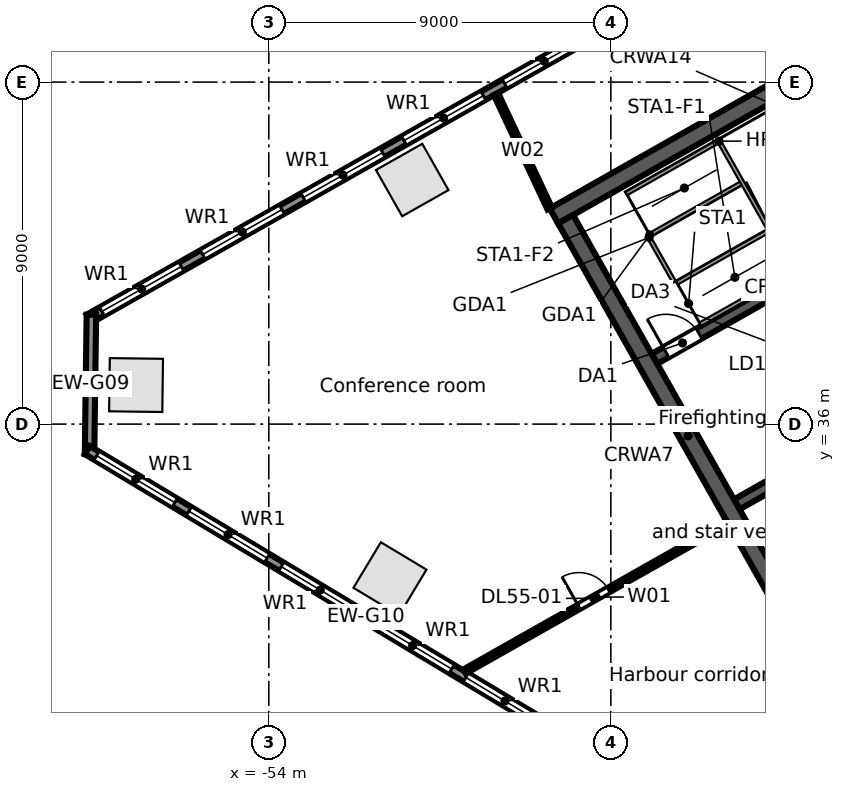
"""IFC4 building model, lengths in metres.
Left out: names, types, materials, properties, quantities, classifications, styles, units other than length and angle.
Written with IfcOpenShell. Run it as: python <this file> out.ifc"""

import sys

from ifc_helpers import new_model, si_unit, direction, frame, frame_2d, origin, origin_2d, place, context, subcontext, project, spatial, rectangle, extrude, element, fill, save


model = new_model("IFC4")
c1 = context("Model", 3, precision=1e-05, world=origin(), true_north=direction((0.0, 1.0)))
c2 = subcontext(c1, "Body", "Model", "MODEL_VIEW")
j1 = project(units=[si_unit("LENGTHUNIT", "METRE"), si_unit("PLANEANGLEUNIT", "RADIAN")], contexts=[c1])
p1 = place(None, origin())
s1 = spatial("IfcSite", under=j1, at=p1, CompositionType="ELEMENT")
p2 = place(p1, origin())
s2 = spatial("IfcBuilding", under=s1, at=p2, CompositionType="ELEMENT")
p3 = place(p2, frame((0.0, 0.0, 250.4)))
s3 = spatial("IfcBuildingStorey", under=s2, at=p3, CompositionType="ELEMENT", Elevation=250.4)
for number, where, z_axis, x_axis in (
    (1, (-50.226, 42.423, 0.0), (0.0, 0.0, 1.0), (-0.87, -0.492, 0.0)),
    (2, (-57.493, 37.027, 0.0), (0.0, 0.0, 1.0), (-0.013, -1.0, 0.0)),
    (3, (-50.812, 31.931, 0.0), (0.0, 0.0, 1.0), (0.857, -0.515, 0.0)),
):
    element("IfcColumn", number, at=place(p3, frame(where, z_axis=z_axis, x_axis=x_axis)), inside=s3, PredefinedType="COLUMN", context=c2, shape_type="SweptSolid", body=[
        extrude(rectangle(XDim=1.4, YDim=1.4, at=origin_2d()), origin(), (0.0, 0.0, 1.0), 3.9),
    ])
p4 = place(p3, frame((-58.732, 38.771, 0.0), z_axis=(0.0, 0.0, 1.0), x_axis=(0.870354824205, 0.492425100887, 0.0)))
e4 = element("IfcWall", 4, at=p4, inside=s3, PredefinedType="STANDARD", context=c2, shape_type="SweptSolid", body=[
    extrude(rectangle(XDim=64.006, YDim=0.25, at=frame_2d((32.003, 0.0))), origin(), (0.0, 0.0, 1.0), 3.62),
])
p5 = place(p4, frame((61.259, 0.0, 0.8)))
e5 = element("IfcOpeningElement", 5, at=p5, cuts=e4, PredefinedType="OPENING", context=c2, shape_type="SweptSolid", body=[
    extrude(rectangle(XDim=2.4, YDim=2.2, at=frame_2d((1.2, 1.1))), frame((0.0, 0.135, 0.0), z_axis=(0.0, -1.0, 0.0), x_axis=(1.0, 0.0, 0.0)), (0.0, 0.0, 1.0), 0.27),
])
p6 = place(p4, frame((58.216, 0.0, 0.8)))
e6 = element("IfcOpeningElement", 6, at=p6, cuts=e4, PredefinedType="OPENING", context=c2, shape_type="SweptSolid", body=[
    extrude(rectangle(XDim=2.4, YDim=2.2, at=frame_2d((1.2, 1.1))), frame((0.0, 0.135, 0.0), z_axis=(0.0, -1.0, 0.0), x_axis=(1.0, 0.0, 0.0)), (0.0, 0.0, 1.0), 0.27),
])
p7 = place(p4, frame((55.173, 0.0, 0.8)))
e7 = element("IfcOpeningElement", 7, at=p7, cuts=e4, PredefinedType="OPENING", context=c2, shape_type="SweptSolid", body=[
    extrude(rectangle(XDim=2.4, YDim=2.2, at=frame_2d((1.2, 1.1))), frame((0.0, 0.135, 0.0), z_axis=(0.0, -1.0, 0.0), x_axis=(1.0, 0.0, 0.0)), (0.0, 0.0, 1.0), 0.27),
])
p8 = place(p4, frame((52.129, 0.0, 0.8)))
e8 = element("IfcOpeningElement", 8, at=p8, cuts=e4, PredefinedType="OPENING", context=c2, shape_type="SweptSolid", body=[
    extrude(rectangle(XDim=2.4, YDim=2.2, at=frame_2d((1.2, 1.1))), frame((0.0, 0.135, 0.0), z_axis=(0.0, -1.0, 0.0), x_axis=(1.0, 0.0, 0.0)), (0.0, 0.0, 1.0), 0.27),
])
p9 = place(p4, frame((49.086, 0.0, 0.8)))
e9 = element("IfcOpeningElement", 9, at=p9, cuts=e4, PredefinedType="OPENING", context=c2, shape_type="SweptSolid", body=[
    extrude(rectangle(XDim=2.4, YDim=2.2, at=frame_2d((1.2, 1.1))), frame((0.0, 0.135, 0.0), z_axis=(0.0, -1.0, 0.0), x_axis=(1.0, 0.0, 0.0)), (0.0, 0.0, 1.0), 0.27),
])
p10 = place(p4, frame((46.043, 0.0, 0.8)))
e10 = element("IfcOpeningElement", 10, at=p10, cuts=e4, PredefinedType="OPENING", context=c2, shape_type="SweptSolid", body=[
    extrude(rectangle(XDim=2.4, YDim=2.2, at=frame_2d((1.2, 1.1))), frame((0.0, 0.135, 0.0), z_axis=(0.0, -1.0, 0.0), x_axis=(1.0, 0.0, 0.0)), (0.0, 0.0, 1.0), 0.27),
])
p11 = place(p4, frame((43.0, 0.0, 0.8)))
e11 = element("IfcOpeningElement", 11, at=p11, cuts=e4, PredefinedType="OPENING", context=c2, shape_type="SweptSolid", body=[
    extrude(rectangle(XDim=2.4, YDim=2.2, at=frame_2d((1.2, 1.1))), frame((0.0, 0.135, 0.0), z_axis=(0.0, -1.0, 0.0), x_axis=(1.0, 0.0, 0.0)), (0.0, 0.0, 1.0), 0.27),
])
p12 = place(p4, frame((39.956, 0.0, 0.8)))
e12 = element("IfcOpeningElement", 12, at=p12, cuts=e4, PredefinedType="OPENING", context=c2, shape_type="SweptSolid", body=[
    extrude(rectangle(XDim=2.4, YDim=2.2, at=frame_2d((1.2, 1.1))), frame((0.0, 0.135, 0.0), z_axis=(0.0, -1.0, 0.0), x_axis=(1.0, 0.0, 0.0)), (0.0, 0.0, 1.0), 0.27),
])
p13 = place(p4, frame((36.913, 0.0, 0.8)))
e13 = element("IfcOpeningElement", 13, at=p13, cuts=e4, PredefinedType="OPENING", context=c2, shape_type="SweptSolid", body=[
    extrude(rectangle(XDim=2.4, YDim=2.2, at=frame_2d((1.2, 1.1))), frame((0.0, 0.135, 0.0), z_axis=(0.0, -1.0, 0.0), x_axis=(1.0, 0.0, 0.0)), (0.0, 0.0, 1.0), 0.27),
])
p14 = place(p4, frame((33.87, 0.0, 0.8)))
e14 = element("IfcOpeningElement", 14, at=p14, cuts=e4, PredefinedType="OPENING", context=c2, shape_type="SweptSolid", body=[
    extrude(rectangle(XDim=2.4, YDim=2.2, at=frame_2d((1.2, 1.1))), frame((0.0, 0.135, 0.0), z_axis=(0.0, -1.0, 0.0), x_axis=(1.0, 0.0, 0.0)), (0.0, 0.0, 1.0), 0.27),
])
p15 = place(p4, frame((30.826, 0.0, 0.8)))
e15 = element("IfcOpeningElement", 15, at=p15, cuts=e4, PredefinedType="OPENING", context=c2, shape_type="SweptSolid", body=[
    extrude(rectangle(XDim=2.4, YDim=2.2, at=frame_2d((1.2, 1.1))), frame((0.0, 0.135, 0.0), z_axis=(0.0, -1.0, 0.0), x_axis=(1.0, 0.0, 0.0)), (0.0, 0.0, 1.0), 0.27),
])
p16 = place(p4, frame((27.783, 0.0, 0.8)))
e16 = element("IfcOpeningElement", 16, at=p16, cuts=e4, PredefinedType="OPENING", context=c2, shape_type="SweptSolid", body=[
    extrude(rectangle(XDim=2.4, YDim=2.2, at=frame_2d((1.2, 1.1))), frame((0.0, 0.135, 0.0), z_axis=(0.0, -1.0, 0.0), x_axis=(1.0, 0.0, 0.0)), (0.0, 0.0, 1.0), 0.27),
])
p17 = place(p4, frame((24.74, 0.0, 0.8)))
e17 = element("IfcOpeningElement", 17, at=p17, cuts=e4, PredefinedType="OPENING", context=c2, shape_type="SweptSolid", body=[
    extrude(rectangle(XDim=2.4, YDim=2.2, at=frame_2d((1.2, 1.1))), frame((0.0, 0.135, 0.0), z_axis=(0.0, -1.0, 0.0), x_axis=(1.0, 0.0, 0.0)), (0.0, 0.0, 1.0), 0.27),
])
p18 = place(p4, frame((21.696, 0.0, 0.8)))
e18 = element("IfcOpeningElement", 18, at=p18, cuts=e4, PredefinedType="OPENING", context=c2, shape_type="SweptSolid", body=[
    extrude(rectangle(XDim=2.4, YDim=2.2, at=frame_2d((1.2, 1.1))), frame((0.0, 0.135, 0.0), z_axis=(0.0, -1.0, 0.0), x_axis=(1.0, 0.0, 0.0)), (0.0, 0.0, 1.0), 0.27),
])
p19 = place(p4, frame((18.653, 0.0, 0.8)))
e19 = element("IfcOpeningElement", 19, at=p19, cuts=e4, PredefinedType="OPENING", context=c2, shape_type="SweptSolid", body=[
    extrude(rectangle(XDim=2.4, YDim=2.2, at=frame_2d((1.2, 1.1))), frame((0.0, 0.135, 0.0), z_axis=(0.0, -1.0, 0.0), x_axis=(1.0, 0.0, 0.0)), (0.0, 0.0, 1.0), 0.27),
])
p20 = place(p4, frame((15.61, 0.0, 0.8)))
e20 = element("IfcOpeningElement", 20, at=p20, cuts=e4, PredefinedType="OPENING", context=c2, shape_type="SweptSolid", body=[
    extrude(rectangle(XDim=2.4, YDim=2.2, at=frame_2d((1.2, 1.1))), frame((0.0, 0.135, 0.0), z_axis=(0.0, -1.0, 0.0), x_axis=(1.0, 0.0, 0.0)), (0.0, 0.0, 1.0), 0.27),
])
p21 = place(p4, frame((12.567, 0.0, 0.8)))
e21 = element("IfcOpeningElement", 21, at=p21, cuts=e4, PredefinedType="OPENING", context=c2, shape_type="SweptSolid", body=[
    extrude(rectangle(XDim=2.4, YDim=2.2, at=frame_2d((1.2, 1.1))), frame((0.0, 0.135, 0.0), z_axis=(0.0, -1.0, 0.0), x_axis=(1.0, 0.0, 0.0)), (0.0, 0.0, 1.0), 0.27),
])
p22 = place(p4, frame((9.523, 0.0, 0.8)))
e22 = element("IfcOpeningElement", 22, at=p22, cuts=e4, PredefinedType="OPENING", context=c2, shape_type="SweptSolid", body=[
    extrude(rectangle(XDim=2.4, YDim=2.2, at=frame_2d((1.2, 1.1))), frame((0.0, 0.135, 0.0), z_axis=(0.0, -1.0, 0.0), x_axis=(1.0, 0.0, 0.0)), (0.0, 0.0, 1.0), 0.27),
])
p23 = place(p4, frame((6.48, 0.0, 0.8)))
e23 = element("IfcOpeningElement", 23, at=p23, cuts=e4, PredefinedType="OPENING", context=c2, shape_type="SweptSolid", body=[
    extrude(rectangle(XDim=2.4, YDim=2.2, at=frame_2d((1.2, 1.1))), frame((0.0, 0.135, 0.0), z_axis=(0.0, -1.0, 0.0), x_axis=(1.0, 0.0, 0.0)), (0.0, 0.0, 1.0), 0.27),
])
p24 = place(p4, frame((3.437, 0.0, 0.8)))
e24 = element("IfcOpeningElement", 24, at=p24, cuts=e4, PredefinedType="OPENING", context=c2, shape_type="SweptSolid", body=[
    extrude(rectangle(XDim=2.4, YDim=2.2, at=frame_2d((1.2, 1.1))), frame((0.0, 0.135, 0.0), z_axis=(0.0, -1.0, 0.0), x_axis=(1.0, 0.0, 0.0)), (0.0, 0.0, 1.0), 0.27),
])
p25 = place(p4, frame((0.393, 0.0, 0.8)))
e25 = element("IfcOpeningElement", 25, at=p25, cuts=e4, PredefinedType="OPENING", context=c2, shape_type="SweptSolid", body=[
    extrude(rectangle(XDim=2.4, YDim=2.2, at=frame_2d((1.2, 1.1))), frame((0.0, 0.135, 0.0), z_axis=(0.0, -1.0, 0.0), x_axis=(1.0, 0.0, 0.0)), (0.0, 0.0, 1.0), 0.27),
])
p26 = place(p3, frame((-58.717, 35.208, 0.0), z_axis=(0.0, 0.0, 1.0), x_axis=(0.01310512158, 0.999914124207, 0.0)))
e26 = element("IfcWall", 26, at=p26, inside=s3, PredefinedType="STANDARD", context=c2, shape_type="SweptSolid", body=[
    extrude(rectangle(XDim=3.67, YDim=0.25, at=frame_2d((1.835, 0.0))), origin(), (0.0, 0.0, 1.0), 3.62),
])
p27 = place(p3, frame((-44.115, 26.507, 0.0), z_axis=(0.0, 0.0, 1.0), x_axis=(-0.857166583633, 0.515039268311, 0.0)))
e27 = element("IfcWall", 27, at=p27, inside=s3, PredefinedType="STANDARD", context=c2, shape_type="SweptSolid", body=[
    extrude(rectangle(XDim=17.106, YDim=0.25, at=frame_2d((8.553, 0.0))), origin(), (0.0, 0.0, 1.0), 3.62),
])
p28 = place(p27, frame((14.417, 0.0, 0.8)))
e28 = element("IfcOpeningElement", 28, at=p28, cuts=e27, PredefinedType="OPENING", context=c2, shape_type="SweptSolid", body=[
    extrude(rectangle(XDim=2.4, YDim=2.2, at=frame_2d((1.2, 1.1))), frame((0.0, 0.135, 0.0), z_axis=(0.0, -1.0, 0.0), x_axis=(1.0, 0.0, 0.0)), (0.0, 0.0, 1.0), 0.27),
])
p29 = place(p27, frame((11.584, 0.0, 0.8)))
e29 = element("IfcOpeningElement", 29, at=p29, cuts=e27, PredefinedType="OPENING", context=c2, shape_type="SweptSolid", body=[
    extrude(rectangle(XDim=2.4, YDim=2.2, at=frame_2d((1.2, 1.1))), frame((0.0, 0.135, 0.0), z_axis=(0.0, -1.0, 0.0), x_axis=(1.0, 0.0, 0.0)), (0.0, 0.0, 1.0), 0.27),
])
p30 = place(p27, frame((8.75, 0.0, 0.8)))
e30 = element("IfcOpeningElement", 30, at=p30, cuts=e27, PredefinedType="OPENING", context=c2, shape_type="SweptSolid", body=[
    extrude(rectangle(XDim=2.4, YDim=2.2, at=frame_2d((1.2, 1.1))), frame((0.0, 0.135, 0.0), z_axis=(0.0, -1.0, 0.0), x_axis=(1.0, 0.0, 0.0)), (0.0, 0.0, 1.0), 0.27),
])
p31 = place(p27, frame((5.917, 0.0, 0.8)))
e31 = element("IfcOpeningElement", 31, at=p31, cuts=e27, PredefinedType="OPENING", context=c2, shape_type="SweptSolid", body=[
    extrude(rectangle(XDim=2.4, YDim=2.2, at=frame_2d((1.2, 1.1))), frame((0.0, 0.135, 0.0), z_axis=(0.0, -1.0, 0.0), x_axis=(1.0, 0.0, 0.0)), (0.0, 0.0, 1.0), 0.27),
])
p32 = place(p27, frame((3.084, 0.0, 0.8)))
e32 = element("IfcOpeningElement", 32, at=p32, cuts=e27, PredefinedType="OPENING", context=c2, shape_type="SweptSolid", body=[
    extrude(rectangle(XDim=2.4, YDim=2.2, at=frame_2d((1.2, 1.1))), frame((0.0, 0.135, 0.0), z_axis=(0.0, -1.0, 0.0), x_axis=(1.0, 0.0, 0.0)), (0.0, 0.0, 1.0), 0.27),
])
p33 = place(p27, frame((0.25, 0.0, 0.8)))
e33 = element("IfcOpeningElement", 33, at=p33, cuts=e27, PredefinedType="OPENING", context=c2, shape_type="SweptSolid", body=[
    extrude(rectangle(XDim=2.4, YDim=2.2, at=frame_2d((1.2, 1.1))), frame((0.0, 0.135, 0.0), z_axis=(0.0, -1.0, 0.0), x_axis=(1.0, 0.0, 0.0)), (0.0, 0.0, 1.0), 0.27),
])
p34 = place(p3, frame((-41.687, 33.887, 0.0), z_axis=(0.0, 0.0, 1.0), x_axis=(0.870355736587, 0.49242348826, 0.0)))
e34 = element("IfcWall", 34, at=p34, inside=s3, PredefinedType="SOLIDWALL", context=c2, shape_type="SweptSolid", body=[
    extrude(rectangle(XDim=6.15, YDim=0.3, at=frame_2d((3.075, 0.0))), origin(), (0.0, 0.0, 1.0), 3.62),
])
p35 = place(p34, frame((1.25, 0.0, 0.0)))
e35 = element("IfcOpeningElement", 35, at=p35, cuts=e34, PredefinedType="OPENING", context=c2, shape_type="SweptSolid", body=[
    extrude(rectangle(XDim=1.1, YDim=2.1, at=frame_2d((0.55, 1.05))), frame((0.0, 0.16, 0.0), z_axis=(0.0, -1.0, 0.0), x_axis=(1.0, 0.0, 0.0)), (0.0, 0.0, 1.0), 0.32),
])
p36 = place(p34, frame((4.4, 0.0, 0.0)))
e36 = element("IfcOpeningElement", 36, at=p36, cuts=e34, PredefinedType="OPENING", context=c2, shape_type="SweptSolid", body=[
    extrude(rectangle(XDim=1.1, YDim=2.1, at=frame_2d((0.55, 1.05))), frame((0.0, 0.16, 0.0), z_axis=(0.0, -1.0, 0.0), x_axis=(1.0, 0.0, 0.0)), (0.0, 0.0, 1.0), 0.32),
])
p37 = place(p3, frame((-43.853, 37.717, 0.0), z_axis=(0.0, 0.0, 1.0), x_axis=(0.870360409231, 0.492415229297, 0.0)))
e37 = element("IfcWall", 37, at=p37, inside=s3, PredefinedType="SOLIDWALL", context=c2, shape_type="SweptSolid", body=[
    extrude(rectangle(XDim=7.55, YDim=0.3, at=frame_2d((3.775, 0.0))), origin(), (0.0, 0.0, 1.0), 3.62),
])
p38 = place(p37, frame((0.35, 0.0, 0.0)))
e38 = element("IfcOpeningElement", 38, at=p38, cuts=e37, PredefinedType="OPENING", context=c2, shape_type="SweptSolid", body=[
    extrude(rectangle(XDim=1.0, YDim=2.1, at=frame_2d((0.5, 1.05))), frame((0.0, 0.16, 0.0), z_axis=(0.0, -1.0, 0.0), x_axis=(1.0, 0.0, 0.0)), (0.0, 0.0, 1.0), 0.32),
])
p39 = place(p3, frame((-46.498, 41.477, 0.0), z_axis=(0.0, 0.0, 1.0), x_axis=(0.870359753402, 0.492416388494, 0.0)))
e39 = element("IfcWall", 39, at=p39, inside=s3, PredefinedType="SOLIDWALL", context=c2, shape_type="SweptSolid", body=[
    extrude(rectangle(XDim=17.0, YDim=0.45, at=frame_2d((8.5, 0.0))), origin(), (0.0, 0.0, 1.0), 3.62),
])
p40 = place(p3, frame((-46.191, 41.392, 0.0), z_axis=(0.0, 0.0, 1.0), x_axis=(0.492421378713, -0.870356930107, 0.0)))
e40 = element("IfcWall", 40, at=p40, inside=s3, PredefinedType="SOLIDWALL", context=c2, shape_type="SweptSolid", body=[
    extrude(rectangle(XDim=13.1, YDim=0.45, at=frame_2d((6.55, 0.0))), origin(), (0.0, 0.0, 1.0), 3.62),
])
p41 = place(p3, frame((-48.843, 29.494, 0.0), z_axis=(0.0, 0.0, 1.0), x_axis=(0.870384139606, 0.492373282705, 0.0)))
e41 = element("IfcWall", 41, at=p41, inside=s3, PredefinedType="PARTITIONING", context=c2, shape_type="SweptSolid", body=[
    extrude(rectangle(XDim=7.941, YDim=0.125, at=frame_2d((3.971, 0.0))), origin(), (0.0, 0.0, 1.0), 2.9),
])
p42 = place(p41, frame((3.45, 0.0, 0.0)))
e42 = element("IfcOpeningElement", 42, at=p42, cuts=e41, PredefinedType="OPENING", context=c2, shape_type="SweptSolid", body=[
    extrude(rectangle(XDim=0.9, YDim=2.1, at=frame_2d((0.45, 1.05))), frame((0.0, 0.073, 0.0), z_axis=(0.0, -1.0, 0.0), x_axis=(1.0, 0.0, 0.0)), (0.0, 0.0, 1.0), 0.145),
])
p43 = place(p3, frame((-48.022, 44.687, 0.0), z_axis=(0.0, 0.0, 1.0), x_axis=(0.424510917438, -0.905422818895, 0.0)))
e43 = element("IfcWall", 43, at=p43, inside=s3, PredefinedType="PARTITIONING", context=c2, shape_type="SweptSolid", body=[
    extrude(rectangle(XDim=3.329, YDim=0.125, at=frame_2d((1.665, 0.0))), origin(), (0.0, 0.0, 1.0), 2.988),
])
p44 = place(p21, origin())
e44 = element("IfcWindow", 44, at=p44, inside=s3, PartitioningType="SINGLE_PANEL", PredefinedType="WINDOW", context=c2, shape_type="SweptSolid", body=[
    extrude(rectangle(XDim=2.4, YDim=2.2, at=frame_2d((1.2, 1.1))), frame((0.0, 0.03, 0.0), z_axis=(0.0, -1.0, 0.0), x_axis=(1.0, 0.0, 0.0)), (0.0, 0.0, 1.0), 0.06),
])
fill(e21, e44)
p45 = place(p22, origin())
e45 = element("IfcWindow", 45, at=p45, inside=s3, PartitioningType="SINGLE_PANEL", PredefinedType="WINDOW", context=c2, shape_type="SweptSolid", body=[
    extrude(rectangle(XDim=2.4, YDim=2.2, at=frame_2d((1.2, 1.1))), frame((0.0, 0.03, 0.0), z_axis=(0.0, -1.0, 0.0), x_axis=(1.0, 0.0, 0.0)), (0.0, 0.0, 1.0), 0.06),
])
fill(e22, e45)
p46 = place(p23, origin())
e46 = element("IfcWindow", 46, at=p46, inside=s3, PartitioningType="SINGLE_PANEL", PredefinedType="WINDOW", context=c2, shape_type="SweptSolid", body=[
    extrude(rectangle(XDim=2.4, YDim=2.2, at=frame_2d((1.2, 1.1))), frame((0.0, 0.03, 0.0), z_axis=(0.0, -1.0, 0.0), x_axis=(1.0, 0.0, 0.0)), (0.0, 0.0, 1.0), 0.06),
])
fill(e23, e46)
p47 = place(p24, origin())
e47 = element("IfcWindow", 47, at=p47, inside=s3, PartitioningType="SINGLE_PANEL", PredefinedType="WINDOW", context=c2, shape_type="SweptSolid", body=[
    extrude(rectangle(XDim=2.4, YDim=2.2, at=frame_2d((1.2, 1.1))), frame((0.0, 0.03, 0.0), z_axis=(0.0, -1.0, 0.0), x_axis=(1.0, 0.0, 0.0)), (0.0, 0.0, 1.0), 0.06),
])
fill(e24, e47)
p48 = place(p25, origin())
e48 = element("IfcWindow", 48, at=p48, inside=s3, PartitioningType="SINGLE_PANEL", PredefinedType="WINDOW", context=c2, shape_type="SweptSolid", body=[
    extrude(rectangle(XDim=2.4, YDim=2.2, at=frame_2d((1.2, 1.1))), frame((0.0, 0.03, 0.0), z_axis=(0.0, -1.0, 0.0), x_axis=(1.0, 0.0, 0.0)), (0.0, 0.0, 1.0), 0.06),
])
fill(e25, e48)
p49 = place(p28, origin())
e49 = element("IfcWindow", 49, at=p49, inside=s3, PartitioningType="SINGLE_PANEL", PredefinedType="WINDOW", context=c2, shape_type="SweptSolid", body=[
    extrude(rectangle(XDim=2.4, YDim=2.2, at=frame_2d((1.2, 1.1))), frame((0.0, 0.03, 0.0), z_axis=(0.0, -1.0, 0.0), x_axis=(1.0, 0.0, 0.0)), (0.0, 0.0, 1.0), 0.06),
])
fill(e28, e49)
p50 = place(p29, origin())
e50 = element("IfcWindow", 50, at=p50, inside=s3, PartitioningType="SINGLE_PANEL", PredefinedType="WINDOW", context=c2, shape_type="SweptSolid", body=[
    extrude(rectangle(XDim=2.4, YDim=2.2, at=frame_2d((1.2, 1.1))), frame((0.0, 0.03, 0.0), z_axis=(0.0, -1.0, 0.0), x_axis=(1.0, 0.0, 0.0)), (0.0, 0.0, 1.0), 0.06),
])
fill(e29, e50)
p51 = place(p30, origin())
e51 = element("IfcWindow", 51, at=p51, inside=s3, PartitioningType="SINGLE_PANEL", PredefinedType="WINDOW", context=c2, shape_type="SweptSolid", body=[
    extrude(rectangle(XDim=2.4, YDim=2.2, at=frame_2d((1.2, 1.1))), frame((0.0, 0.03, 0.0), z_axis=(0.0, -1.0, 0.0), x_axis=(1.0, 0.0, 0.0)), (0.0, 0.0, 1.0), 0.06),
])
fill(e30, e51)
p52 = place(p31, origin())
e52 = element("IfcWindow", 52, at=p52, inside=s3, PartitioningType="SINGLE_PANEL", PredefinedType="WINDOW", context=c2, shape_type="SweptSolid", body=[
    extrude(rectangle(XDim=2.4, YDim=2.2, at=frame_2d((1.2, 1.1))), frame((0.0, 0.03, 0.0), z_axis=(0.0, -1.0, 0.0), x_axis=(1.0, 0.0, 0.0)), (0.0, 0.0, 1.0), 0.06),
])
fill(e31, e52)
p53 = place(p32, origin())
e53 = element("IfcWindow", 53, at=p53, inside=s3, PartitioningType="SINGLE_PANEL", PredefinedType="WINDOW", context=c2, shape_type="SweptSolid", body=[
    extrude(rectangle(XDim=2.4, YDim=2.2, at=frame_2d((1.2, 1.1))), frame((0.0, 0.03, 0.0), z_axis=(0.0, -1.0, 0.0), x_axis=(1.0, 0.0, 0.0)), (0.0, 0.0, 1.0), 0.06),
])
fill(e32, e53)
p54 = place(p38, origin())
e54 = element("IfcDoor", 54, at=p54, inside=s3, OperationType="SINGLE_SWING_LEFT", PredefinedType="DOOR", context=c2, shape_type="SweptSolid", body=[
    extrude(rectangle(XDim=1.0, YDim=2.1, at=frame_2d((0.5, 1.05))), frame((0.0, 0.025, 0.0), z_axis=(0.0, -1.0, 0.0), x_axis=(1.0, 0.0, 0.0)), (0.0, 0.0, 1.0), 0.05),
])
fill(e38, e54)
p55 = place(p42, origin())
e55 = element("IfcDoor", 55, at=p55, inside=s3, OperationType="SINGLE_SWING_LEFT", PredefinedType="DOOR", context=c2, shape_type="SweptSolid", body=[
    extrude(rectangle(XDim=0.9, YDim=2.1, at=frame_2d((0.45, 1.05))), frame((0.0, 0.025, 0.0), z_axis=(0.0, -1.0, 0.0), x_axis=(1.0, 0.0, 0.0)), (0.0, 0.0, 1.0), 0.05),
])
fill(e42, e55)
save(model, sys.argv[1])
